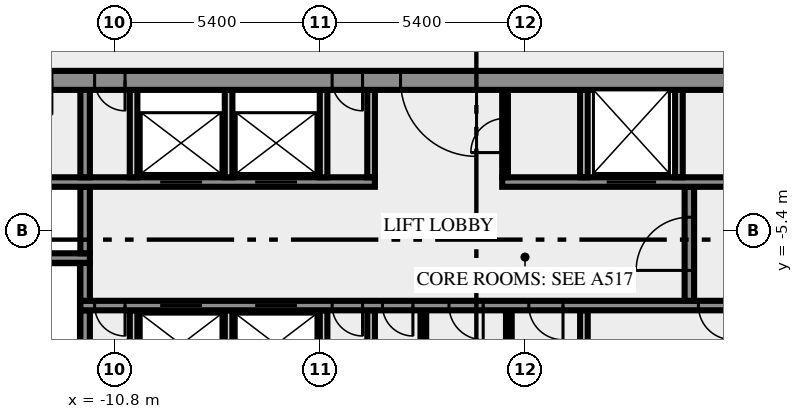
"""IFC4 building model, lengths in metres.
Left out: names, types, materials, properties, quantities, classifications, styles, units other than length and angle.
Written with IfcOpenShell. Run it as: python <this file> out.ifc"""

import sys

from ifc_helpers import new_model, si_unit, direction, frame, frame_2d, origin, place, context, subcontext, project, spatial, rectangle, extrude, element, fill, save


model = new_model("IFC4")
c1 = context("Model", 3, precision=1e-05, world=origin(), true_north=direction((0.0, 1.0)))
c2 = subcontext(c1, "Body", "Model", "MODEL_VIEW")
j1 = project(units=[si_unit("LENGTHUNIT", "METRE"), si_unit("PLANEANGLEUNIT", "RADIAN")], contexts=[c1])
p1 = place(None, origin())
s1 = spatial("IfcSite", under=j1, at=p1, CompositionType="ELEMENT")
p2 = place(p1, origin())
s2 = spatial("IfcBuilding", under=s1, at=p2, CompositionType="ELEMENT")
p3 = place(p2, frame((0.0, 0.0, 307.0)))
s3 = spatial("IfcBuildingStorey", under=s2, at=p3, CompositionType="ELEMENT", Elevation=307.0)
p4 = place(p3, frame((-11.575, -10.5, 0.0), z_axis=(0.0, 0.0, 1.0), x_axis=(0.0, 1.0, 0.0)))
e1 = element("IfcWall", 1, at=p4, inside=s3, PredefinedType="SHEAR", context=c2, shape_type="SweptSolid", body=[
    extrude(rectangle(XDim=3.0, YDim=0.25, at=frame_2d((1.5, 0.0))), origin(), (0.0, 0.0, 1.0), 3.65),
])
for number, where, z_axis, x_axis in (
    (2, (-10.3, -10.5, 0.0), (0.0, 0.0, 1.0), (0.0, 1.0, 0.0)),
    (3, (-7.8, -10.5, 0.0), (0.0, 0.0, 1.0), (0.0, 1.0, 0.0)),
    (4, (-5.3, -10.5, 0.0), (0.0, 0.0, 1.0), (0.0, 1.0, 0.0)),
    (5, (-4.05, -10.5, 0.0), (0.0, 0.0, 1.0), (0.0, 1.0, 0.0)),
):
    element("IfcWall", number, at=place(p3, frame(where, z_axis=z_axis, x_axis=x_axis)), inside=s3, PredefinedType="SOLIDWALL", context=c2, shape_type="SweptSolid", body=[
        extrude(rectangle(XDim=3.0, YDim=0.2, at=frame_2d((1.5, 0.0))), origin(), (0.0, 0.0, 1.0), 3.65),
    ])
for number, where, z_axis, x_axis in (
    (6, (-2.675, -10.5, 0.0), (0.0, 0.0, 1.0), (0.0, 1.0, 0.0)),
    (7, (-0.425, -10.5, 0.0), (0.0, 0.0, 1.0), (0.0, 1.0, 0.0)),
):
    element("IfcWall", number, at=place(p3, frame(where, z_axis=z_axis, x_axis=x_axis)), inside=s3, PredefinedType="PARTITIONING", context=c2, shape_type="SweptSolid", body=[
        extrude(rectangle(XDim=3.0, YDim=0.15, at=frame_2d((1.5, 0.0))), origin(), (0.0, 0.0, 1.0), 3.65),
    ])
p5 = place(p3, frame((1.55, -10.5, 0.0), z_axis=(0.0, 0.0, 1.0), x_axis=(0.0, 1.0, 0.0)))
e8 = element("IfcWall", 8, at=p5, inside=s3, PredefinedType="SOLIDWALL", context=c2, shape_type="SweptSolid", body=[
    extrude(rectangle(XDim=3.0, YDim=0.2, at=frame_2d((1.5, 0.0))), origin(), (0.0, 0.0, 1.0), 3.65),
])
p6 = place(p3, frame((11.7, -7.375, 0.0), z_axis=(0.0, 0.0, 1.0), x_axis=(-1.0, 0.0, 0.0)))
e9 = element("IfcWall", 9, at=p6, inside=s3, PredefinedType="SHEAR", context=c2, shape_type="SweptSolid", body=[
    extrude(rectangle(XDim=23.4, YDim=0.25, at=frame_2d((11.7, 0.0))), origin(), (0.0, 0.0, 1.0), 3.65),
])
p7 = place(p6, frame((22.225, 0.0, 0.0)))
e10 = element("IfcOpeningElement", 10, at=p7, cuts=e9, PredefinedType="OPENING", context=c2, shape_type="SweptSolid", body=[
    extrude(rectangle(XDim=0.8, YDim=2.1, at=frame_2d((0.4, 1.05))), frame((0.0, 0.135, 0.0), z_axis=(0.0, -1.0, 0.0), x_axis=(1.0, 0.0, 0.0)), (0.0, 0.0, 1.0), 0.27),
])
p8 = place(p6, frame((20.2, 0.0, 0.0)))
e11 = element("IfcOpeningElement", 11, at=p8, cuts=e9, PredefinedType="OPENING", context=c2, shape_type="SweptSolid", body=[
    extrude(rectangle(XDim=1.1, YDim=2.1, at=frame_2d((0.55, 1.05))), frame((0.0, 0.135, 0.0), z_axis=(0.0, -1.0, 0.0), x_axis=(1.0, 0.0, 0.0)), (0.0, 0.0, 1.0), 0.27),
])
p9 = place(p6, frame((17.7, 0.0, 0.0)))
e12 = element("IfcOpeningElement", 12, at=p9, cuts=e9, PredefinedType="OPENING", context=c2, shape_type="SweptSolid", body=[
    extrude(rectangle(XDim=1.1, YDim=2.1, at=frame_2d((0.55, 1.05))), frame((0.0, 0.135, 0.0), z_axis=(0.0, -1.0, 0.0), x_axis=(1.0, 0.0, 0.0)), (0.0, 0.0, 1.0), 0.27),
])
p10 = place(p6, frame((15.975, 0.0, 0.0)))
e13 = element("IfcOpeningElement", 13, at=p10, cuts=e9, PredefinedType="OPENING", context=c2, shape_type="SweptSolid", body=[
    extrude(rectangle(XDim=0.8, YDim=2.1, at=frame_2d((0.4, 1.05))), frame((0.0, 0.135, 0.0), z_axis=(0.0, -1.0, 0.0), x_axis=(1.0, 0.0, 0.0)), (0.0, 0.0, 1.0), 0.27),
])
p11 = place(p6, frame((14.65, 0.0, 0.0)))
e14 = element("IfcOpeningElement", 14, at=p11, cuts=e9, PredefinedType="OPENING", context=c2, shape_type="SweptSolid", body=[
    extrude(rectangle(XDim=0.8, YDim=2.1, at=frame_2d((0.4, 1.05))), frame((0.0, 0.135, 0.0), z_axis=(0.0, -1.0, 0.0), x_axis=(1.0, 0.0, 0.0)), (0.0, 0.0, 1.0), 0.27),
])
p12 = place(p6, frame((12.8, 0.0, 0.0)))
e15 = element("IfcOpeningElement", 15, at=p12, cuts=e9, PredefinedType="OPENING", context=c2, shape_type="SweptSolid", body=[
    extrude(rectangle(XDim=0.9, YDim=2.1, at=frame_2d((0.45, 1.05))), frame((0.0, 0.135, 0.0), z_axis=(0.0, -1.0, 0.0), x_axis=(1.0, 0.0, 0.0)), (0.0, 0.0, 1.0), 0.27),
])
p13 = place(p6, frame((10.7, 0.0, 0.0)))
e16 = element("IfcOpeningElement", 16, at=p13, cuts=e9, PredefinedType="OPENING", context=c2, shape_type="SweptSolid", body=[
    extrude(rectangle(XDim=0.9, YDim=2.1, at=frame_2d((0.45, 1.05))), frame((0.0, 0.135, 0.0), z_axis=(0.0, -1.0, 0.0), x_axis=(1.0, 0.0, 0.0)), (0.0, 0.0, 1.0), 0.27),
])
p14 = place(p6, frame((6.237, 0.0, 0.0)))
e17 = element("IfcOpeningElement", 17, at=p14, cuts=e9, PredefinedType="OPENING", context=c2, shape_type="SweptSolid", body=[
    extrude(rectangle(XDim=0.9, YDim=2.1, at=frame_2d((0.45, 1.05))), frame((0.0, 0.135, 0.0), z_axis=(0.0, -1.0, 0.0), x_axis=(1.0, 0.0, 0.0)), (0.0, 0.0, 1.0), 0.27),
])
p15 = place(p6, frame((1.263, 0.0, 0.0)))
e18 = element("IfcOpeningElement", 18, at=p15, cuts=e9, PredefinedType="OPENING", context=c2, shape_type="SweptSolid", body=[
    extrude(rectangle(XDim=0.9, YDim=2.1, at=frame_2d((0.45, 1.05))), frame((0.0, 0.135, 0.0), z_axis=(0.0, -1.0, 0.0), x_axis=(1.0, 0.0, 0.0)), (0.0, 0.0, 1.0), 0.27),
])
p16 = place(p3, frame((-11.575, -7.25, 0.0), z_axis=(0.0, 0.0, 1.0), x_axis=(0.0, 1.0, 0.0)))
e19 = element("IfcWall", 19, at=p16, inside=s3, PredefinedType="SHEAR", context=c2, shape_type="SweptSolid", body=[
    extrude(rectangle(XDim=1.0, YDim=0.25, at=frame_2d((0.5, 0.0))), origin(), (0.0, 0.0, 1.0), 3.65),
])
p17 = place(p3, frame((4.325, -7.25, 0.0), z_axis=(0.0, 0.0, 1.0), x_axis=(0.0, 1.0, 0.0)))
e20 = element("IfcWall", 20, at=p17, inside=s3, PredefinedType="SHEAR", context=c2, shape_type="SweptSolid", body=[
    extrude(rectangle(XDim=3.0, YDim=0.25, at=frame_2d((1.5, 0.0))), origin(), (0.0, 0.0, 1.0), 3.65),
])
p18 = place(p17, frame((0.8, 0.0, 0.0)))
e21 = element("IfcOpeningElement", 21, at=p18, cuts=e20, PredefinedType="OPENING", context=c2, shape_type="SweptSolid", body=[
    extrude(rectangle(XDim=1.4, YDim=2.1, at=frame_2d((0.7, 1.05))), frame((0.0, 0.135, 0.0), z_axis=(0.0, -1.0, 0.0), x_axis=(1.0, 0.0, 0.0)), (0.0, 0.0, 1.0), 0.27),
])
p19 = place(p3, frame((-11.45, -6.125, 0.0), z_axis=(0.0, 0.0, 1.0), x_axis=(-1.0, 0.0, 0.0)))
e22 = element("IfcWall", 22, at=p19, inside=s3, PredefinedType="SHEAR", context=c2, shape_type="SweptSolid", body=[
    extrude(rectangle(XDim=8.05, YDim=0.25, at=frame_2d((4.025, 0.0))), origin(), (0.0, 0.0, 1.0), 3.65),
])
p20 = place(p19, frame((6.2, 0.0, 0.0)))
e23 = element("IfcOpeningElement", 23, at=p20, cuts=e22, PredefinedType="OPENING", context=c2, shape_type="SweptSolid", body=[
    extrude(rectangle(XDim=1.8, YDim=2.1, at=frame_2d((0.9, 1.05))), frame((0.0, 0.135, 0.0), z_axis=(0.0, -1.0, 0.0), x_axis=(1.0, 0.0, 0.0)), (0.0, 0.0, 1.0), 0.27),
])
p21 = place(p3, frame((-11.575, -6.0, 0.0), z_axis=(0.0, 0.0, 1.0), x_axis=(0.0, 1.0, 0.0)))
e24 = element("IfcWall", 24, at=p21, inside=s3, PredefinedType="SHEAR", context=c2, shape_type="SweptSolid", body=[
    extrude(rectangle(XDim=1.75, YDim=0.25, at=frame_2d((0.875, 0.0))), origin(), (0.0, 0.0, 1.0), 3.65),
])
p22 = place(p3, frame((-14.35, -4.125, 0.0), z_axis=(0.0, 0.0, 1.0), x_axis=(1.0, 0.0, 0.0)))
e25 = element("IfcWall", 25, at=p22, inside=s3, PredefinedType="SHEAR", context=c2, shape_type="SweptSolid", body=[
    extrude(rectangle(XDim=10.4, YDim=0.25, at=frame_2d((5.2, 0.0))), origin(), (0.0, 0.0, 1.0), 3.65),
])
p23 = place(p22, frame((4.75, 0.0, 0.0)))
e26 = element("IfcOpeningElement", 26, at=p23, cuts=e25, PredefinedType="OPENING", context=c2, shape_type="SweptSolid", body=[
    extrude(rectangle(XDim=1.1, YDim=2.1, at=frame_2d((0.55, 1.05))), frame((0.0, 0.135, 0.0), z_axis=(0.0, -1.0, 0.0), x_axis=(1.0, 0.0, 0.0)), (0.0, 0.0, 1.0), 0.27),
])
p24 = place(p22, frame((7.25, 0.0, 0.0)))
e27 = element("IfcOpeningElement", 27, at=p24, cuts=e25, PredefinedType="OPENING", context=c2, shape_type="SweptSolid", body=[
    extrude(rectangle(XDim=1.1, YDim=2.1, at=frame_2d((0.55, 1.05))), frame((0.0, 0.135, 0.0), z_axis=(0.0, -1.0, 0.0), x_axis=(1.0, 0.0, 0.0)), (0.0, 0.0, 1.0), 0.27),
])
p25 = place(p3, frame((-0.6, -4.125, 0.0), z_axis=(0.0, 0.0, 1.0), x_axis=(1.0, 0.0, 0.0)))
e28 = element("IfcWall", 28, at=p25, inside=s3, PredefinedType="SHEAR", context=c2, shape_type="SweptSolid", body=[
    extrude(rectangle(XDim=14.95, YDim=0.25, at=frame_2d((7.475, 0.0))), origin(), (0.0, 0.0, 1.0), 3.65),
])
p26 = place(p25, frame((2.75, 0.0, 0.0)))
e29 = element("IfcOpeningElement", 29, at=p26, cuts=e28, PredefinedType="OPENING", context=c2, shape_type="SweptSolid", body=[
    extrude(rectangle(XDim=1.3, YDim=2.1, at=frame_2d((0.65, 1.05))), frame((0.0, 0.135, 0.0), z_axis=(0.0, -1.0, 0.0), x_axis=(1.0, 0.0, 0.0)), (0.0, 0.0, 1.0), 0.27),
])
p27 = place(p3, frame((-11.575, -4.0, 0.0), z_axis=(0.0, 0.0, 1.0), x_axis=(0.0, 1.0, 0.0)))
e30 = element("IfcWall", 30, at=p27, inside=s3, PredefinedType="SHEAR", context=c2, shape_type="SweptSolid", body=[
    extrude(rectangle(XDim=2.3, YDim=0.25, at=frame_2d((1.15, 0.0))), origin(), (0.0, 0.0, 1.0), 3.65),
])
for number, where, z_axis, x_axis in (
    (31, (-10.3, -4.0, 0.0), (0.0, 0.0, 1.0), (0.0, 1.0, 0.0)),
    (32, (-7.8, -4.0, 0.0), (0.0, 0.0, 1.0), (0.0, 1.0, 0.0)),
    (33, (-5.3, -4.0, 0.0), (0.0, 0.0, 1.0), (0.0, 1.0, 0.0)),
    (34, (-4.05, -4.0, 0.0), (0.0, 0.0, 1.0), (0.0, 1.0, 0.0)),
):
    element("IfcWall", number, at=place(p3, frame(where, z_axis=z_axis, x_axis=x_axis)), inside=s3, PredefinedType="SOLIDWALL", context=c2, shape_type="SweptSolid", body=[
        extrude(rectangle(XDim=2.3, YDim=0.2, at=frame_2d((1.15, 0.0))), origin(), (0.0, 0.0, 1.0), 3.65),
    ])
p28 = place(p3, frame((-0.525, -4.0, 0.0), z_axis=(0.0, 0.0, 1.0), x_axis=(0.0, 1.0, 0.0)))
e35 = element("IfcWall", 35, at=p28, inside=s3, PredefinedType="PARTITIONING", context=c2, shape_type="SweptSolid", body=[
    extrude(rectangle(XDim=2.3, YDim=0.15, at=frame_2d((1.15, 0.0))), origin(), (0.0, 0.0, 1.0), 3.65),
])
p29 = place(p28, frame((0.65, 0.0, 0.0)))
e36 = element("IfcOpeningElement", 36, at=p29, cuts=e35, PredefinedType="OPENING", context=c2, shape_type="SweptSolid", body=[
    extrude(rectangle(XDim=0.9, YDim=2.1, at=frame_2d((0.45, 1.05))), frame((0.0, 0.085, 0.0), z_axis=(0.0, -1.0, 0.0), x_axis=(1.0, 0.0, 0.0)), (0.0, 0.0, 1.0), 0.17),
])
for number, where, z_axis, x_axis in (
    (37, (1.55, -4.0, 0.0), (0.0, 0.0, 1.0), (0.0, 1.0, 0.0)),
    (38, (4.05, -4.0, 0.0), (0.0, 0.0, 1.0), (0.0, 1.0, 0.0)),
):
    element("IfcWall", number, at=place(p3, frame(where, z_axis=z_axis, x_axis=x_axis)), inside=s3, PredefinedType="SOLIDWALL", context=c2, shape_type="SweptSolid", body=[
        extrude(rectangle(XDim=2.3, YDim=0.2, at=frame_2d((1.15, 0.0))), origin(), (0.0, 0.0, 1.0), 3.65),
    ])
p30 = place(p3, frame((20.49, -1.45, 0.0), z_axis=(0.0, 0.0, 1.0), x_axis=(-1.0, 0.0, 0.0)))
e39 = element("IfcWall", 39, at=p30, inside=s3, PredefinedType="SHEAR", context=c2, shape_type="SweptSolid", body=[
    extrude(rectangle(XDim=40.98, YDim=0.5, at=frame_2d((20.49, 0.0))), origin(), (0.0, 0.0, 1.0), 3.65),
])
p31 = place(p30, frame((38.14, 0.0, 0.0)))
e40 = element("IfcOpeningElement", 40, at=p31, cuts=e39, PredefinedType="OPENING", context=c2, shape_type="SweptSolid", body=[
    extrude(rectangle(XDim=1.8, YDim=2.1, at=frame_2d((0.9, 1.05))), frame((0.0, 0.26, 0.0), z_axis=(0.0, -1.0, 0.0), x_axis=(1.0, 0.0, 0.0)), (0.0, 0.0, 1.0), 0.52),
])
p32 = place(p30, frame((35.89, 0.0, 0.0)))
e41 = element("IfcOpeningElement", 41, at=p32, cuts=e39, PredefinedType="OPENING", context=c2, shape_type="SweptSolid", body=[
    extrude(rectangle(XDim=0.9, YDim=2.1, at=frame_2d((0.45, 1.05))), frame((0.0, 0.26, 0.0), z_axis=(0.0, -1.0, 0.0), x_axis=(1.0, 0.0, 0.0)), (0.0, 0.0, 1.0), 0.52),
])
p33 = place(p30, frame((32.94, 0.0, 0.0)))
e42 = element("IfcOpeningElement", 42, at=p33, cuts=e39, PredefinedType="OPENING", context=c2, shape_type="SweptSolid", body=[
    extrude(rectangle(XDim=0.9, YDim=2.1, at=frame_2d((0.45, 1.05))), frame((0.0, 0.26, 0.0), z_axis=(0.0, -1.0, 0.0), x_axis=(1.0, 0.0, 0.0)), (0.0, 0.0, 1.0), 0.52),
])
p34 = place(p30, frame((31.015, 0.0, 0.0)))
e43 = element("IfcOpeningElement", 43, at=p34, cuts=e39, PredefinedType="OPENING", context=c2, shape_type="SweptSolid", body=[
    extrude(rectangle(XDim=0.8, YDim=2.1, at=frame_2d((0.4, 1.05))), frame((0.0, 0.26, 0.0), z_axis=(0.0, -1.0, 0.0), x_axis=(1.0, 0.0, 0.0)), (0.0, 0.0, 1.0), 0.52),
])
p35 = place(p30, frame((24.765, 0.0, 0.0)))
e44 = element("IfcOpeningElement", 44, at=p35, cuts=e39, PredefinedType="OPENING", context=c2, shape_type="SweptSolid", body=[
    extrude(rectangle(XDim=0.8, YDim=2.1, at=frame_2d((0.4, 1.05))), frame((0.0, 0.26, 0.0), z_axis=(0.0, -1.0, 0.0), x_axis=(1.0, 0.0, 0.0)), (0.0, 0.0, 1.0), 0.52),
])
p36 = place(p30, frame((21.765, 0.0, 0.0)))
e45 = element("IfcOpeningElement", 45, at=p36, cuts=e39, PredefinedType="OPENING", context=c2, shape_type="SweptSolid", body=[
    extrude(rectangle(XDim=2.0, YDim=2.1, at=frame_2d((1.0, 1.05))), frame((0.0, 0.26, 0.0), z_axis=(0.0, -1.0, 0.0), x_axis=(1.0, 0.0, 0.0)), (0.0, 0.0, 1.0), 0.52),
])
p37 = place(p30, frame((12.24, 0.0, 0.0)))
e46 = element("IfcOpeningElement", 46, at=p37, cuts=e39, PredefinedType="OPENING", context=c2, shape_type="SweptSolid", body=[
    extrude(rectangle(XDim=0.9, YDim=2.1, at=frame_2d((0.45, 1.05))), frame((0.0, 0.26, 0.0), z_axis=(0.0, -1.0, 0.0), x_axis=(1.0, 0.0, 0.0)), (0.0, 0.0, 1.0), 0.52),
])
p38 = place(p30, frame((7.14, 0.0, 0.0)))
e47 = element("IfcOpeningElement", 47, at=p38, cuts=e39, PredefinedType="OPENING", context=c2, shape_type="SweptSolid", body=[
    extrude(rectangle(XDim=0.9, YDim=2.1, at=frame_2d((0.45, 1.05))), frame((0.0, 0.26, 0.0), z_axis=(0.0, -1.0, 0.0), x_axis=(1.0, 0.0, 0.0)), (0.0, 0.0, 1.0), 0.52),
])
p39 = place(p30, frame((5.028, 0.0, 0.0)))
e48 = element("IfcOpeningElement", 48, at=p39, cuts=e39, PredefinedType="OPENING", context=c2, shape_type="SweptSolid", body=[
    extrude(rectangle(XDim=0.8, YDim=2.1, at=frame_2d((0.4, 1.05))), frame((0.0, 0.26, 0.0), z_axis=(0.0, -1.0, 0.0), x_axis=(1.0, 0.0, 0.0)), (0.0, 0.0, 1.0), 0.52),
])
p40 = place(p30, frame((3.452, 0.0, 0.0)))
e49 = element("IfcOpeningElement", 49, at=p40, cuts=e39, PredefinedType="OPENING", context=c2, shape_type="SweptSolid", body=[
    extrude(rectangle(XDim=0.8, YDim=2.1, at=frame_2d((0.4, 1.05))), frame((0.0, 0.26, 0.0), z_axis=(0.0, -1.0, 0.0), x_axis=(1.0, 0.0, 0.0)), (0.0, 0.0, 1.0), 0.52),
])
p41 = place(p30, frame((1.04, 0.0, 0.0)))
e50 = element("IfcOpeningElement", 50, at=p41, cuts=e39, PredefinedType="OPENING", context=c2, shape_type="SweptSolid", body=[
    extrude(rectangle(XDim=1.8, YDim=2.1, at=frame_2d((0.9, 1.05))), frame((0.0, 0.26, 0.0), z_axis=(0.0, -1.0, 0.0), x_axis=(1.0, 0.0, 0.0)), (0.0, 0.0, 1.0), 0.52),
])
p42 = place(p7, origin())
e51 = element("IfcDoor", 51, at=p42, inside=s3, OperationType="SINGLE_SWING_RIGHT", PredefinedType="DOOR", context=c2, shape_type="SweptSolid", body=[
    extrude(rectangle(XDim=0.8, YDim=2.1, at=frame_2d((0.4, 1.05))), frame((0.0, 0.025, 0.0), z_axis=(0.0, -1.0, 0.0), x_axis=(1.0, 0.0, 0.0)), (0.0, 0.0, 1.0), 0.05),
])
fill(e10, e51)
p43 = place(p8, origin())
e52 = element("IfcDoor", 52, at=p43, inside=s3, OperationType="DOUBLE_DOOR_SLIDING", PredefinedType="DOOR", context=c2, shape_type="SweptSolid", body=[
    extrude(rectangle(XDim=1.1, YDim=2.1, at=frame_2d((0.55, 1.05))), frame((0.0, 0.025, 0.0), z_axis=(0.0, -1.0, 0.0), x_axis=(1.0, 0.0, 0.0)), (0.0, 0.0, 1.0), 0.05),
])
fill(e11, e52)
p44 = place(p9, origin())
e53 = element("IfcDoor", 53, at=p44, inside=s3, OperationType="DOUBLE_DOOR_SLIDING", PredefinedType="DOOR", context=c2, shape_type="SweptSolid", body=[
    extrude(rectangle(XDim=1.1, YDim=2.1, at=frame_2d((0.55, 1.05))), frame((0.0, 0.025, 0.0), z_axis=(0.0, -1.0, 0.0), x_axis=(1.0, 0.0, 0.0)), (0.0, 0.0, 1.0), 0.05),
])
fill(e12, e53)
p45 = place(p10, origin())
e54 = element("IfcDoor", 54, at=p45, inside=s3, OperationType="SINGLE_SWING_RIGHT", PredefinedType="DOOR", context=c2, shape_type="SweptSolid", body=[
    extrude(rectangle(XDim=0.8, YDim=2.1, at=frame_2d((0.4, 1.05))), frame((0.0, 0.025, 0.0), z_axis=(0.0, -1.0, 0.0), x_axis=(1.0, 0.0, 0.0)), (0.0, 0.0, 1.0), 0.05),
])
fill(e13, e54)
p46 = place(p11, origin())
e55 = element("IfcDoor", 55, at=p46, inside=s3, OperationType="SINGLE_SWING_RIGHT", PredefinedType="DOOR", context=c2, shape_type="SweptSolid", body=[
    extrude(rectangle(XDim=0.8, YDim=2.1, at=frame_2d((0.4, 1.05))), frame((0.0, 0.025, 0.0), z_axis=(0.0, -1.0, 0.0), x_axis=(1.0, 0.0, 0.0)), (0.0, 0.0, 1.0), 0.05),
])
fill(e14, e55)
p47 = place(p12, origin())
e56 = element("IfcDoor", 56, at=p47, inside=s3, OperationType="SINGLE_SWING_RIGHT", PredefinedType="DOOR", context=c2, shape_type="SweptSolid", body=[
    extrude(rectangle(XDim=0.9, YDim=2.1, at=frame_2d((0.45, 1.05))), frame((0.0, 0.025, 0.0), z_axis=(0.0, -1.0, 0.0), x_axis=(1.0, 0.0, 0.0)), (0.0, 0.0, 1.0), 0.05),
])
fill(e15, e56)
p48 = place(p13, origin())
e57 = element("IfcDoor", 57, at=p48, inside=s3, OperationType="SINGLE_SWING_LEFT", PredefinedType="DOOR", context=c2, shape_type="SweptSolid", body=[
    extrude(rectangle(XDim=0.9, YDim=2.1, at=frame_2d((0.45, 1.05))), frame((0.0, 0.025, 0.0), z_axis=(0.0, -1.0, 0.0), x_axis=(1.0, 0.0, 0.0)), (0.0, 0.0, 1.0), 0.05),
])
fill(e16, e57)
p49 = place(p14, origin())
e58 = element("IfcDoor", 58, at=p49, inside=s3, OperationType="SINGLE_SWING_LEFT", PredefinedType="DOOR", context=c2, shape_type="SweptSolid", body=[
    extrude(rectangle(XDim=0.9, YDim=2.1, at=frame_2d((0.45, 1.05))), frame((0.0, 0.025, 0.0), z_axis=(0.0, -1.0, 0.0), x_axis=(1.0, 0.0, 0.0)), (0.0, 0.0, 1.0), 0.05),
])
fill(e17, e58)
p50 = place(p18, origin())
e59 = element("IfcDoor", 59, at=p50, inside=s3, OperationType="DOUBLE_DOOR_SINGLE_SWING", PredefinedType="DOOR", context=c2, shape_type="SweptSolid", body=[
    extrude(rectangle(XDim=1.4, YDim=2.1, at=frame_2d((0.7, 1.05))), frame((0.0, 0.025, 0.0), z_axis=(0.0, -1.0, 0.0), x_axis=(1.0, 0.0, 0.0)), (0.0, 0.0, 1.0), 0.05),
])
fill(e21, e59)
p51 = place(p23, origin())
e60 = element("IfcDoor", 60, at=p51, inside=s3, OperationType="DOUBLE_DOOR_SLIDING", PredefinedType="DOOR", context=c2, shape_type="SweptSolid", body=[
    extrude(rectangle(XDim=1.1, YDim=2.1, at=frame_2d((0.55, 1.05))), frame((0.0, 0.025, 0.0), z_axis=(0.0, -1.0, 0.0), x_axis=(1.0, 0.0, 0.0)), (0.0, 0.0, 1.0), 0.05),
])
fill(e26, e60)
p52 = place(p24, origin())
e61 = element("IfcDoor", 61, at=p52, inside=s3, OperationType="DOUBLE_DOOR_SLIDING", PredefinedType="DOOR", context=c2, shape_type="SweptSolid", body=[
    extrude(rectangle(XDim=1.1, YDim=2.1, at=frame_2d((0.55, 1.05))), frame((0.0, 0.025, 0.0), z_axis=(0.0, -1.0, 0.0), x_axis=(1.0, 0.0, 0.0)), (0.0, 0.0, 1.0), 0.05),
])
fill(e27, e61)
p53 = place(p26, origin())
e62 = element("IfcDoor", 62, at=p53, inside=s3, OperationType="DOUBLE_DOOR_SLIDING", PredefinedType="DOOR", context=c2, shape_type="SweptSolid", body=[
    extrude(rectangle(XDim=1.3, YDim=2.1, at=frame_2d((0.65, 1.05))), frame((0.0, 0.025, 0.0), z_axis=(0.0, -1.0, 0.0), x_axis=(1.0, 0.0, 0.0)), (0.0, 0.0, 1.0), 0.05),
])
fill(e29, e62)
p54 = place(p29, origin())
e63 = element("IfcDoor", 63, at=p54, inside=s3, OperationType="SINGLE_SWING_LEFT", PredefinedType="DOOR", context=c2, shape_type="SweptSolid", body=[
    extrude(rectangle(XDim=0.9, YDim=2.1, at=frame_2d((0.45, 1.05))), frame((0.0, 0.025, 0.0), z_axis=(0.0, -1.0, 0.0), x_axis=(1.0, 0.0, 0.0)), (0.0, 0.0, 1.0), 0.05),
])
fill(e36, e63)
p55 = place(p34, origin())
e64 = element("IfcDoor", 64, at=p55, inside=s3, OperationType="SINGLE_SWING_RIGHT", PredefinedType="DOOR", context=c2, shape_type="SweptSolid", body=[
    extrude(rectangle(XDim=0.8, YDim=2.1, at=frame_2d((0.4, 1.05))), frame((0.0, 0.025, 0.0), z_axis=(0.0, -1.0, 0.0), x_axis=(1.0, 0.0, 0.0)), (0.0, 0.0, 1.0), 0.05),
])
fill(e43, e64)
p56 = place(p35, origin())
e65 = element("IfcDoor", 65, at=p56, inside=s3, OperationType="SINGLE_SWING_RIGHT", PredefinedType="DOOR", context=c2, shape_type="SweptSolid", body=[
    extrude(rectangle(XDim=0.8, YDim=2.1, at=frame_2d((0.4, 1.05))), frame((0.0, 0.025, 0.0), z_axis=(0.0, -1.0, 0.0), x_axis=(1.0, 0.0, 0.0)), (0.0, 0.0, 1.0), 0.05),
])
fill(e44, e65)
p57 = place(p36, origin())
e66 = element("IfcDoor", 66, at=p57, inside=s3, OperationType="DOUBLE_DOOR_SINGLE_SWING", PredefinedType="DOOR", context=c2, shape_type="SweptSolid", body=[
    extrude(rectangle(XDim=2.0, YDim=2.1, at=frame_2d((1.0, 1.05))), frame((0.0, 0.025, 0.0), z_axis=(0.0, -1.0, 0.0), x_axis=(1.0, 0.0, 0.0)), (0.0, 0.0, 1.0), 0.05),
])
fill(e45, e66)
save(model, sys.argv[1])
